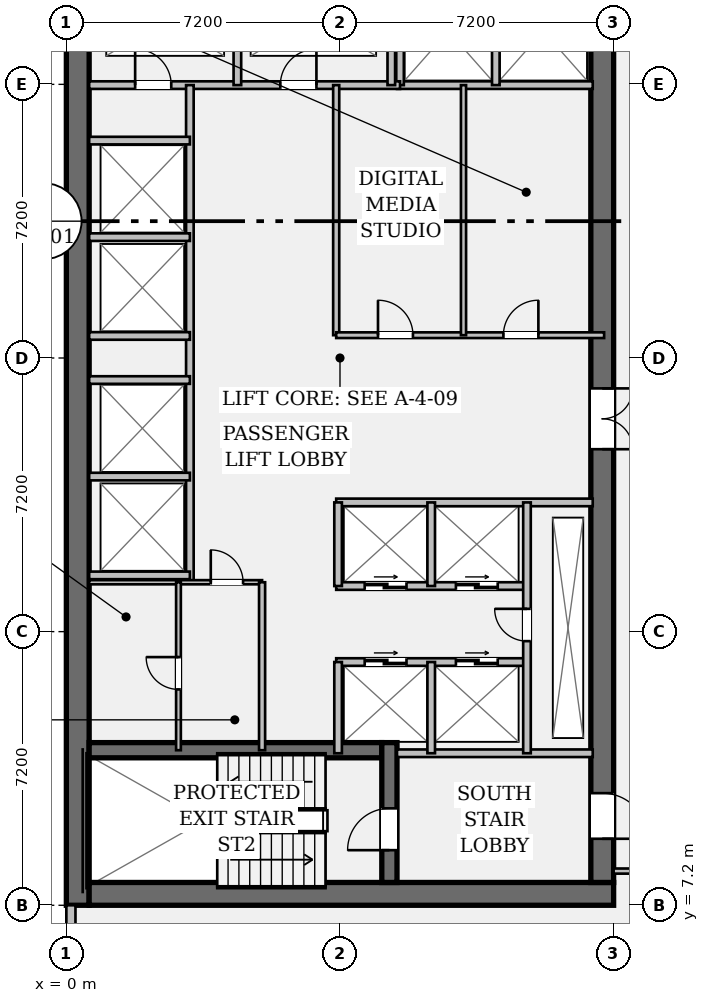
"""IFC4 building model, lengths in metres.
Left out: names, types, materials, properties, quantities, classifications, styles, units other than length and angle.
Written with IfcOpenShell. Run it as: python <this file> out.ifc"""

import sys

from ifc_helpers import new_model, si_unit, direction, frame, frame_2d, origin, place, context, subcontext, project, spatial, rectangle, extrude, element, fill, save


model = new_model("IFC4")
c1 = context("Model", 3, precision=1e-05, world=origin(), true_north=direction((0.0, 1.0)))
c2 = subcontext(c1, "Body", "Model", "MODEL_VIEW")
j1 = project(units=[si_unit("LENGTHUNIT", "METRE"), si_unit("PLANEANGLEUNIT", "RADIAN")], contexts=[c1])
p1 = place(None, origin())
s1 = spatial("IfcSite", under=j1, at=p1, CompositionType="ELEMENT")
p2 = place(p1, origin())
s2 = spatial("IfcBuilding", under=s1, at=p2, CompositionType="ELEMENT")
p3 = place(p2, frame((0.0, 0.0, 156.1)))
s3 = spatial("IfcBuildingStorey", under=s2, at=p3, CompositionType="ELEMENT", Elevation=156.1)
p4 = place(p3, frame((0.3, 7.2, 0.0), z_axis=(0.0, 0.0, 1.0), x_axis=(0.0, 1.0, 0.0)))
e1 = element("IfcWall", 1, at=p4, inside=s3, PredefinedType="SHEAR", context=c2, shape_type="SweptSolid", body=[
    extrude(rectangle(XDim=28.8, YDim=0.6, at=frame_2d((14.4, 0.0))), origin(), (0.0, 0.0, 1.0), 3.58),
])
p5 = place(p3, frame((0.6, 7.5, 0.0), z_axis=(0.0, 0.0, 1.0), x_axis=(1.0, 0.0, 0.0)))
e2 = element("IfcWall", 2, at=p5, inside=s3, PredefinedType="SHEAR", context=c2, shape_type="SweptSolid", body=[
    extrude(rectangle(XDim=13.8, YDim=0.6, at=frame_2d((6.9, 0.0))), origin(), (0.0, 0.0, 1.0), 3.58),
])
p6 = place(p3, frame((14.1, 35.4, 0.0), z_axis=(0.0, 0.0, 1.0), x_axis=(0.0, -1.0, 0.0)))
e3 = element("IfcWall", 3, at=p6, inside=s3, PredefinedType="SHEAR", context=c2, shape_type="SweptSolid", body=[
    extrude(rectangle(XDim=27.6, YDim=0.6, at=frame_2d((13.8, 0.0))), origin(), (0.0, 0.0, 1.0), 3.58),
])
p7 = place(p6, frame((1.3, 0.0, 0.0)))
e4 = element("IfcOpeningElement", 4, at=p7, cuts=e3, PredefinedType="OPENING", context=c2, shape_type="SweptSolid", body=[
    extrude(rectangle(XDim=1.2, YDim=2.15, at=frame_2d((0.6, 1.075))), frame((0.0, 0.312, 0.0), z_axis=(0.0, -1.0, 0.0), x_axis=(1.0, 0.0, 0.0)), (0.0, 0.0, 1.0), 0.624),
])
p8 = place(p6, frame((25.25, 0.0, 0.0)))
e5 = element("IfcOpeningElement", 5, at=p8, cuts=e3, PredefinedType="OPENING", context=c2, shape_type="SweptSolid", body=[
    extrude(rectangle(XDim=1.2, YDim=2.15, at=frame_2d((0.6, 1.075))), frame((0.0, 0.312, 0.0), z_axis=(0.0, -1.0, 0.0), x_axis=(1.0, 0.0, 0.0)), (0.0, 0.0, 1.0), 0.624),
])
p9 = place(p6, frame((14.6, 0.0, 0.0)))
e6 = element("IfcOpeningElement", 6, at=p9, cuts=e3, PredefinedType="OPENING", context=c2, shape_type="SweptSolid", body=[
    extrude(rectangle(XDim=1.6, YDim=2.2, at=frame_2d((0.8, 1.1))), frame((0.0, 0.312, 0.0), z_axis=(0.0, -1.0, 0.0), x_axis=(1.0, 0.0, 0.0)), (0.0, 0.0, 1.0), 0.624),
])
p10 = place(p3, frame((0.6, 11.28, 0.0), z_axis=(0.0, 0.0, 1.0), x_axis=(1.0, 0.0, 0.0)))
e7 = element("IfcWall", 7, at=p10, inside=s3, PredefinedType="SHEAR", context=c2, shape_type="SweptSolid", body=[
    extrude(rectangle(XDim=7.7, YDim=0.4, at=frame_2d((3.85, 0.0))), origin(), (0.0, 0.0, 1.0), 3.58),
])
p11 = place(p3, frame((8.5, 7.8, 0.0), z_axis=(0.0, 0.0, 1.0), x_axis=(0.0, 1.0, 0.0)))
e8 = element("IfcWall", 8, at=p11, inside=s3, PredefinedType="SHEAR", context=c2, shape_type="SweptSolid", body=[
    extrude(rectangle(XDim=3.68, YDim=0.4, at=frame_2d((1.84, 0.0))), origin(), (0.0, 0.0, 1.0), 3.58),
])
p12 = place(p11, frame((0.85, 0.0, 0.0)))
e9 = element("IfcOpeningElement", 9, at=p12, cuts=e8, PredefinedType="OPENING", context=c2, shape_type="SweptSolid", body=[
    extrude(rectangle(XDim=1.1, YDim=2.15, at=frame_2d((0.55, 1.075))), frame((0.0, 0.212, 0.0), z_axis=(0.0, -1.0, 0.0), x_axis=(1.0, 0.0, 0.0)), (0.0, 0.0, 1.0), 0.424),
])
p13 = place(p3, frame((0.12, 5.95, 0.0), z_axis=(0.0, 0.0, 1.0), x_axis=(0.0, 1.0, 0.0)))
e10 = element("IfcWall", 10, at=p13, inside=s3, PredefinedType="STANDARD", context=c2, shape_type="SweptSolid", body=[
    extrude(rectangle(XDim=1.25, YDim=0.24, at=frame_2d((0.625, 0.0))), origin(), (0.0, 0.0, 1.0), 3.58),
])
for number, where, z_axis, x_axis in (
    (11, (8.7, 11.2, 0.0), (0.0, 0.0, 1.0), (1.0, 0.0, 0.0)),
    (12, (8.7, 28.78, 0.0), (0.0, 0.0, 1.0), (1.0, 0.0, 0.0)),
):
    element("IfcWall", number, at=place(p3, frame(where, z_axis=z_axis, x_axis=x_axis)), inside=s3, PredefinedType="PARTITIONING", context=c2, shape_type="SweptSolid", body=[
        extrude(rectangle(XDim=5.15, YDim=0.2, at=frame_2d((2.575, 0.0))), origin(), (0.0, 0.0, 1.0), 3.58),
    ])
for number, where, z_axis, x_axis in (
    (13, (8.78, 28.78, 0.0), (0.0, 0.0, 1.0), (0.0, 1.0, 0.0)),
    (14, (11.3, 28.78, 0.0), (0.0, 0.0, 1.0), (0.0, 1.0, 0.0)),
):
    element("IfcWall", number, at=place(p3, frame(where, z_axis=z_axis, x_axis=x_axis)), inside=s3, PredefinedType="PARTITIONING", context=c2, shape_type="SweptSolid", body=[
        extrude(rectangle(XDim=3.1, YDim=0.2, at=frame_2d((1.55, 0.0))), origin(), (0.0, 0.0, 1.0), 3.58),
    ])
p14 = place(p3, frame((0.6, 28.78, 0.0), z_axis=(0.0, 0.0, 1.0), x_axis=(1.0, 0.0, 0.0)))
e15 = element("IfcWall", 15, at=p14, inside=s3, PredefinedType="PARTITIONING", context=c2, shape_type="SweptSolid", body=[
    extrude(rectangle(XDim=8.18, YDim=0.2, at=frame_2d((4.09, 0.0))), origin(), (0.0, 0.0, 1.0), 3.58),
])
p15 = place(p14, frame((1.21, 0.0, 0.0)))
e16 = element("IfcOpeningElement", 16, at=p15, cuts=e15, PredefinedType="OPENING", context=c2, shape_type="SweptSolid", body=[
    extrude(rectangle(XDim=0.95, YDim=2.15, at=frame_2d((0.475, 1.075))), frame((0.0, 0.112, 0.0), z_axis=(0.0, -1.0, 0.0), x_axis=(1.0, 0.0, 0.0)), (0.0, 0.0, 1.0), 0.224),
])
p16 = place(p14, frame((5.03, 0.0, 0.0)))
e17 = element("IfcOpeningElement", 17, at=p16, cuts=e15, PredefinedType="OPENING", context=c2, shape_type="SweptSolid", body=[
    extrude(rectangle(XDim=0.95, YDim=2.15, at=frame_2d((0.475, 1.075))), frame((0.0, 0.112, 0.0), z_axis=(0.0, -1.0, 0.0), x_axis=(1.0, 0.0, 0.0)), (0.0, 0.0, 1.0), 0.224),
])
for number, where, z_axis, x_axis in (
    (18, (4.5, 28.78, 0.0), (0.0, 0.0, 1.0), (0.0, 1.0, 0.0)),
    (19, (8.55, 28.78, 0.0), (0.0, 0.0, 1.0), (0.0, 1.0, 0.0)),
):
    element("IfcWall", number, at=place(p3, frame(where, z_axis=z_axis, x_axis=x_axis)), inside=s3, PredefinedType="PARTITIONING", context=c2, shape_type="SweptSolid", body=[
        extrude(rectangle(XDim=2.94, YDim=0.2, at=frame_2d((1.47, 0.0))), origin(), (0.0, 0.0, 1.0), 3.58),
    ])
p17 = place(p3, frame((3.25, 15.7, 0.0), z_axis=(0.0, 0.0, 1.0), x_axis=(0.0, 1.0, 0.0)))
e20 = element("IfcWall", 20, at=p17, inside=s3, PredefinedType="PARTITIONING", context=c2, shape_type="SweptSolid", body=[
    extrude(rectangle(XDim=13.08, YDim=0.2, at=frame_2d((6.54, 0.0))), origin(), (0.0, 0.0, 1.0), 3.58),
])
for number, where, z_axis, x_axis in (
    (21, (0.6, 15.88, 0.0), (0.0, 0.0, 1.0), (1.0, 0.0, 0.0)),
    (22, (0.6, 18.48, 0.0), (0.0, 0.0, 1.0), (1.0, 0.0, 0.0)),
    (23, (0.6, 22.18, 0.0), (0.0, 0.0, 1.0), (1.0, 0.0, 0.0)),
    (24, (0.6, 24.78, 0.0), (0.0, 0.0, 1.0), (1.0, 0.0, 0.0)),
    (25, (0.6, 21.02, 0.0), (0.0, 0.0, 1.0), (1.0, 0.0, 0.0)),
    (26, (0.6, 27.32, 0.0), (0.0, 0.0, 1.0), (1.0, 0.0, 0.0)),
):
    element("IfcWall", number, at=place(p3, frame(where, z_axis=z_axis, x_axis=x_axis)), inside=s3, PredefinedType="PARTITIONING", context=c2, shape_type="SweptSolid", body=[
        extrude(rectangle(XDim=2.65, YDim=0.2, at=frame_2d((1.325, 0.0))), origin(), (0.0, 0.0, 1.0), 3.58),
    ])
p18 = place(p3, frame((7.1, 22.2, 0.0), z_axis=(0.0, 0.0, 1.0), x_axis=(0.0, 1.0, 0.0)))
e27 = element("IfcWall", 27, at=p18, inside=s3, PredefinedType="PARTITIONING", context=c2, shape_type="SweptSolid", body=[
    extrude(rectangle(XDim=6.58, YDim=0.16, at=frame_2d((3.29, 0.0))), origin(), (0.0, 0.0, 1.0), 3.58),
])
p19 = place(p3, frame((7.1, 22.2, 0.0), z_axis=(0.0, 0.0, 1.0), x_axis=(1.0, 0.0, 0.0)))
e28 = element("IfcWall", 28, at=p19, inside=s3, PredefinedType="PARTITIONING", context=c2, shape_type="SweptSolid", body=[
    extrude(rectangle(XDim=7.05, YDim=0.15, at=frame_2d((3.525, 0.0))), origin(), (0.0, 0.0, 1.0), 3.58),
])
p20 = place(p19, frame((1.1, 0.0, 0.0)))
e29 = element("IfcOpeningElement", 29, at=p20, cuts=e28, PredefinedType="OPENING", context=c2, shape_type="SweptSolid", body=[
    extrude(rectangle(XDim=0.92, YDim=2.15, at=frame_2d((0.46, 1.075))), frame((0.0, 0.087, 0.0), z_axis=(0.0, -1.0, 0.0), x_axis=(1.0, 0.0, 0.0)), (0.0, 0.0, 1.0), 0.174),
])
p21 = place(p19, frame((4.4, 0.0, 0.0)))
e30 = element("IfcOpeningElement", 30, at=p21, cuts=e28, PredefinedType="OPENING", context=c2, shape_type="SweptSolid", body=[
    extrude(rectangle(XDim=0.92, YDim=2.15, at=frame_2d((0.46, 1.075))), frame((0.0, 0.087, 0.0), z_axis=(0.0, -1.0, 0.0), x_axis=(1.0, 0.0, 0.0)), (0.0, 0.0, 1.0), 0.174),
])
p22 = place(p3, frame((10.45, 22.2, 0.0), z_axis=(0.0, 0.0, 1.0), x_axis=(0.0, 1.0, 0.0)))
e31 = element("IfcWall", 31, at=p22, inside=s3, PredefinedType="PARTITIONING", context=c2, shape_type="SweptSolid", body=[
    extrude(rectangle(XDim=6.58, YDim=0.135, at=frame_2d((3.29, 0.0))), origin(), (0.0, 0.0, 1.0), 3.58),
])
p23 = place(p3, frame((7.1, 17.8, 0.0), z_axis=(0.0, 0.0, 1.0), x_axis=(1.0, 0.0, 0.0)))
e32 = element("IfcWall", 32, at=p23, inside=s3, PredefinedType="PARTITIONING", context=c2, shape_type="SweptSolid", body=[
    extrude(rectangle(XDim=6.75, YDim=0.2, at=frame_2d((3.375, 0.0))), origin(), (0.0, 0.0, 1.0), 3.58),
])
p24 = place(p3, frame((7.1, 15.6, 0.0), z_axis=(0.0, 0.0, 1.0), x_axis=(1.0, 0.0, 0.0)))
e33 = element("IfcWall", 33, at=p24, inside=s3, PredefinedType="PARTITIONING", context=c2, shape_type="SweptSolid", body=[
    extrude(rectangle(XDim=5.02, YDim=0.2, at=frame_2d((2.51, 0.0))), origin(), (0.0, 0.0, 1.0), 3.58),
])
p25 = place(p24, frame((0.75, 0.0, 0.0)))
e34 = element("IfcOpeningElement", 34, at=p25, cuts=e33, PredefinedType="OPENING", context=c2, shape_type="SweptSolid", body=[
    extrude(rectangle(XDim=1.1, YDim=2.2, at=frame_2d((0.55, 1.1))), frame((0.0, 0.112, 0.0), z_axis=(0.0, -1.0, 0.0), x_axis=(1.0, 0.0, 0.0)), (0.0, 0.0, 1.0), 0.224),
])
p26 = place(p24, frame((3.15, 0.0, 0.0)))
e35 = element("IfcOpeningElement", 35, at=p26, cuts=e33, PredefinedType="OPENING", context=c2, shape_type="SweptSolid", body=[
    extrude(rectangle(XDim=1.1, YDim=2.2, at=frame_2d((0.55, 1.1))), frame((0.0, 0.112, 0.0), z_axis=(0.0, -1.0, 0.0), x_axis=(1.0, 0.0, 0.0)), (0.0, 0.0, 1.0), 0.224),
])
p27 = place(p3, frame((7.1, 13.6, 0.0), z_axis=(0.0, 0.0, 1.0), x_axis=(1.0, 0.0, 0.0)))
e36 = element("IfcWall", 36, at=p27, inside=s3, PredefinedType="PARTITIONING", context=c2, shape_type="SweptSolid", body=[
    extrude(rectangle(XDim=5.02, YDim=0.2, at=frame_2d((2.51, 0.0))), origin(), (0.0, 0.0, 1.0), 3.58),
])
p28 = place(p27, frame((0.75, 0.0, 0.0)))
e37 = element("IfcOpeningElement", 37, at=p28, cuts=e36, PredefinedType="OPENING", context=c2, shape_type="SweptSolid", body=[
    extrude(rectangle(XDim=1.1, YDim=2.2, at=frame_2d((0.55, 1.1))), frame((0.0, 0.112, 0.0), z_axis=(0.0, -1.0, 0.0), x_axis=(1.0, 0.0, 0.0)), (0.0, 0.0, 1.0), 0.224),
])
p29 = place(p27, frame((3.15, 0.0, 0.0)))
e38 = element("IfcOpeningElement", 38, at=p29, cuts=e36, PredefinedType="OPENING", context=c2, shape_type="SweptSolid", body=[
    extrude(rectangle(XDim=1.1, YDim=2.2, at=frame_2d((0.55, 1.1))), frame((0.0, 0.112, 0.0), z_axis=(0.0, -1.0, 0.0), x_axis=(1.0, 0.0, 0.0)), (0.0, 0.0, 1.0), 0.224),
])
p30 = place(p3, frame((7.15, 15.6, 0.0), z_axis=(0.0, 0.0, 1.0), x_axis=(0.0, 1.0, 0.0)))
e39 = element("IfcWall", 39, at=p30, inside=s3, PredefinedType="PARTITIONING", context=c2, shape_type="SweptSolid", body=[
    extrude(rectangle(XDim=2.2, YDim=0.2, at=frame_2d((1.1, 0.0))), origin(), (0.0, 0.0, 1.0), 3.58),
])
p31 = place(p3, frame((7.15, 11.2, 0.0), z_axis=(0.0, 0.0, 1.0), x_axis=(0.0, 1.0, 0.0)))
e40 = element("IfcWall", 40, at=p31, inside=s3, PredefinedType="PARTITIONING", context=c2, shape_type="SweptSolid", body=[
    extrude(rectangle(XDim=2.4, YDim=0.2, at=frame_2d((1.2, 0.0))), origin(), (0.0, 0.0, 1.0), 3.58),
])
p32 = place(p3, frame((9.6, 15.6, 0.0), z_axis=(0.0, 0.0, 1.0), x_axis=(0.0, 1.0, 0.0)))
e41 = element("IfcWall", 41, at=p32, inside=s3, PredefinedType="PARTITIONING", context=c2, shape_type="SweptSolid", body=[
    extrude(rectangle(XDim=2.2, YDim=0.2, at=frame_2d((1.1, 0.0))), origin(), (0.0, 0.0, 1.0), 3.58),
])
p33 = place(p3, frame((9.6, 11.2, 0.0), z_axis=(0.0, 0.0, 1.0), x_axis=(0.0, 1.0, 0.0)))
e42 = element("IfcWall", 42, at=p33, inside=s3, PredefinedType="PARTITIONING", context=c2, shape_type="SweptSolid", body=[
    extrude(rectangle(XDim=2.4, YDim=0.2, at=frame_2d((1.2, 0.0))), origin(), (0.0, 0.0, 1.0), 3.58),
])
p34 = place(p3, frame((12.12, 11.2, 0.0), z_axis=(0.0, 0.0, 1.0), x_axis=(0.0, 1.0, 0.0)))
e43 = element("IfcWall", 43, at=p34, inside=s3, PredefinedType="PARTITIONING", context=c2, shape_type="SweptSolid", body=[
    extrude(rectangle(XDim=6.6, YDim=0.2, at=frame_2d((3.3, 0.0))), origin(), (0.0, 0.0, 1.0), 3.58),
])
p35 = place(p34, frame((2.95, 0.0, 0.0)))
e44 = element("IfcOpeningElement", 44, at=p35, cuts=e43, PredefinedType="OPENING", context=c2, shape_type="SweptSolid", body=[
    extrude(rectangle(XDim=0.85, YDim=2.15, at=frame_2d((0.425, 1.075))), frame((0.0, 0.112, 0.0), z_axis=(0.0, -1.0, 0.0), x_axis=(1.0, 0.0, 0.0)), (0.0, 0.0, 1.0), 0.224),
])
p36 = place(p3, frame((0.6, 15.7, 0.0), z_axis=(0.0, 0.0, 1.0), x_axis=(1.0, 0.0, 0.0)))
e45 = element("IfcWall", 45, at=p36, inside=s3, PredefinedType="PARTITIONING", context=c2, shape_type="SweptSolid", body=[
    extrude(rectangle(XDim=4.55, YDim=0.11, at=frame_2d((2.275, 0.0))), origin(), (0.0, 0.0, 1.0), 3.58),
])
p37 = place(p36, frame((3.2, 0.0, 0.0)))
e46 = element("IfcOpeningElement", 46, at=p37, cuts=e45, PredefinedType="OPENING", context=c2, shape_type="SweptSolid", body=[
    extrude(rectangle(XDim=0.85, YDim=2.15, at=frame_2d((0.425, 1.075))), frame((0.0, 0.067, 0.0), z_axis=(0.0, -1.0, 0.0), x_axis=(1.0, 0.0, 0.0)), (0.0, 0.0, 1.0), 0.134),
])
p38 = place(p3, frame((5.15, 11.28, 0.0), z_axis=(0.0, 0.0, 1.0), x_axis=(0.0, 1.0, 0.0)))
e47 = element("IfcWall", 47, at=p38, inside=s3, PredefinedType="PARTITIONING", context=c2, shape_type="SweptSolid", body=[
    extrude(rectangle(XDim=4.42, YDim=0.16, at=frame_2d((2.21, 0.0))), origin(), (0.0, 0.0, 1.0), 3.58),
])
p39 = place(p3, frame((2.95, 11.28, 0.0), z_axis=(0.0, 0.0, 1.0), x_axis=(0.0, 1.0, 0.0)))
e48 = element("IfcWall", 48, at=p39, inside=s3, PredefinedType="PARTITIONING", context=c2, shape_type="SweptSolid", body=[
    extrude(rectangle(XDim=4.42, YDim=0.125, at=frame_2d((2.21, 0.0))), origin(), (0.0, 0.0, 1.0), 3.58),
])
p40 = place(p39, frame((1.6, 0.0, 0.0)))
e49 = element("IfcOpeningElement", 49, at=p40, cuts=e48, PredefinedType="OPENING", context=c2, shape_type="SweptSolid", body=[
    extrude(rectangle(XDim=0.85, YDim=2.15, at=frame_2d((0.425, 1.075))), frame((0.0, 0.074, 0.0), z_axis=(0.0, -1.0, 0.0), x_axis=(1.0, 0.0, 0.0)), (0.0, 0.0, 1.0), 0.149),
])
p41 = place(p3, frame((14.4, 8.1, 0.0), z_axis=(0.0, 0.0, 1.0), x_axis=(1.0, 0.0, 0.0)))
e50 = element("IfcWall", 50, at=p41, inside=s3, PredefinedType="PARTITIONING", context=c2, shape_type="SweptSolid", body=[
    extrude(rectangle(XDim=2.95, YDim=0.135, at=frame_2d((1.475, 0.0))), origin(), (0.0, 0.0, 1.0), 3.148),
])
p42 = place(p41, frame((0.95, 0.0, 0.0)))
e51 = element("IfcOpeningElement", 51, at=p42, cuts=e50, PredefinedType="OPENING", context=c2, shape_type="SweptSolid", body=[
    extrude(rectangle(XDim=0.92, YDim=2.15, at=frame_2d((0.46, 1.075))), frame((0.0, 0.08, 0.0), z_axis=(0.0, -1.0, 0.0), x_axis=(1.0, 0.0, 0.0)), (0.0, 0.0, 1.0), 0.159),
])
p43 = place(p12, origin())
e52 = element("IfcDoor", 52, at=p43, inside=s3, OperationType="SINGLE_SWING_LEFT", PredefinedType="DOOR", context=c2, shape_type="SweptSolid", body=[
    extrude(rectangle(XDim=1.1, YDim=2.15, at=frame_2d((0.55, 1.075))), frame((0.0, 0.025, 0.0), z_axis=(0.0, -1.0, 0.0), x_axis=(1.0, 0.0, 0.0)), (0.0, 0.0, 1.0), 0.05),
])
fill(e9, e52)
p44 = place(p8, origin())
e53 = element("IfcDoor", 53, at=p44, inside=s3, OperationType="SINGLE_SWING_RIGHT", PredefinedType="DOOR", context=c2, shape_type="SweptSolid", body=[
    extrude(rectangle(XDim=1.2, YDim=2.15, at=frame_2d((0.6, 1.075))), frame((0.0, 0.025, 0.0), z_axis=(0.0, -1.0, 0.0), x_axis=(1.0, 0.0, 0.0)), (0.0, 0.0, 1.0), 0.05),
])
fill(e5, e53)
p45 = place(p15, origin())
e54 = element("IfcDoor", 54, at=p45, inside=s3, OperationType="SINGLE_SWING_LEFT", PredefinedType="DOOR", context=c2, shape_type="SweptSolid", body=[
    extrude(rectangle(XDim=0.95, YDim=2.15, at=frame_2d((0.475, 1.075))), frame((0.0, 0.025, 0.0), z_axis=(0.0, -1.0, 0.0), x_axis=(1.0, 0.0, 0.0)), (0.0, 0.0, 1.0), 0.05),
])
fill(e16, e54)
p46 = place(p16, origin())
e55 = element("IfcDoor", 55, at=p46, inside=s3, OperationType="SINGLE_SWING_RIGHT", PredefinedType="DOOR", context=c2, shape_type="SweptSolid", body=[
    extrude(rectangle(XDim=0.95, YDim=2.15, at=frame_2d((0.475, 1.075))), frame((0.0, 0.025, 0.0), z_axis=(0.0, -1.0, 0.0), x_axis=(1.0, 0.0, 0.0)), (0.0, 0.0, 1.0), 0.05),
])
fill(e17, e55)
p47 = place(p9, origin())
e56 = element("IfcDoor", 56, at=p47, inside=s3, OperationType="DOUBLE_DOOR_SINGLE_SWING", PredefinedType="DOOR", context=c2, shape_type="SweptSolid", body=[
    extrude(rectangle(XDim=1.6, YDim=2.2, at=frame_2d((0.8, 1.1))), frame((0.0, 0.025, 0.0), z_axis=(0.0, -1.0, 0.0), x_axis=(1.0, 0.0, 0.0)), (0.0, 0.0, 1.0), 0.05),
])
fill(e6, e56)
p48 = place(p20, origin())
e57 = element("IfcDoor", 57, at=p48, inside=s3, OperationType="SINGLE_SWING_LEFT", PredefinedType="DOOR", context=c2, shape_type="SweptSolid", body=[
    extrude(rectangle(XDim=0.92, YDim=2.15, at=frame_2d((0.46, 1.075))), frame((0.0, 0.025, 0.0), z_axis=(0.0, -1.0, 0.0), x_axis=(1.0, 0.0, 0.0)), (0.0, 0.0, 1.0), 0.05),
])
fill(e29, e57)
p49 = place(p21, origin())
e58 = element("IfcDoor", 58, at=p49, inside=s3, OperationType="SINGLE_SWING_RIGHT", PredefinedType="DOOR", context=c2, shape_type="SweptSolid", body=[
    extrude(rectangle(XDim=0.92, YDim=2.15, at=frame_2d((0.46, 1.075))), frame((0.0, 0.025, 0.0), z_axis=(0.0, -1.0, 0.0), x_axis=(1.0, 0.0, 0.0)), (0.0, 0.0, 1.0), 0.05),
])
fill(e30, e58)
p50 = place(p35, origin())
e59 = element("IfcDoor", 59, at=p50, inside=s3, OperationType="SINGLE_SWING_RIGHT", PredefinedType="DOOR", context=c2, shape_type="SweptSolid", body=[
    extrude(rectangle(XDim=0.85, YDim=2.15, at=frame_2d((0.425, 1.075))), frame((0.0, 0.025, 0.0), z_axis=(0.0, -1.0, 0.0), x_axis=(1.0, 0.0, 0.0)), (0.0, 0.0, 1.0), 0.05),
])
fill(e44, e59)
p51 = place(p25, origin())
e60 = element("IfcDoor", 60, at=p51, inside=s3, OperationType="DOUBLE_DOOR_SLIDING", PredefinedType="DOOR", context=c2, shape_type="SweptSolid", body=[
    extrude(rectangle(XDim=1.1, YDim=2.2, at=frame_2d((0.55, 1.1))), frame((0.0, 0.025, 0.0), z_axis=(0.0, -1.0, 0.0), x_axis=(1.0, 0.0, 0.0)), (0.0, 0.0, 1.0), 0.05),
])
fill(e34, e60)
p52 = place(p26, origin())
e61 = element("IfcDoor", 61, at=p52, inside=s3, OperationType="DOUBLE_DOOR_SLIDING", PredefinedType="DOOR", context=c2, shape_type="SweptSolid", body=[
    extrude(rectangle(XDim=1.1, YDim=2.2, at=frame_2d((0.55, 1.1))), frame((0.0, 0.025, 0.0), z_axis=(0.0, -1.0, 0.0), x_axis=(1.0, 0.0, 0.0)), (0.0, 0.0, 1.0), 0.05),
])
fill(e35, e61)
p53 = place(p28, origin())
e62 = element("IfcDoor", 62, at=p53, inside=s3, OperationType="DOUBLE_DOOR_SLIDING", PredefinedType="DOOR", context=c2, shape_type="SweptSolid", body=[
    extrude(rectangle(XDim=1.1, YDim=2.2, at=frame_2d((0.55, 1.1))), frame((0.0, 0.025, 0.0), z_axis=(0.0, -1.0, 0.0), x_axis=(1.0, 0.0, 0.0)), (0.0, 0.0, 1.0), 0.05),
])
fill(e37, e62)
p54 = place(p29, origin())
e63 = element("IfcDoor", 63, at=p54, inside=s3, OperationType="DOUBLE_DOOR_SLIDING", PredefinedType="DOOR", context=c2, shape_type="SweptSolid", body=[
    extrude(rectangle(XDim=1.1, YDim=2.2, at=frame_2d((0.55, 1.1))), frame((0.0, 0.025, 0.0), z_axis=(0.0, -1.0, 0.0), x_axis=(1.0, 0.0, 0.0)), (0.0, 0.0, 1.0), 0.05),
])
fill(e38, e63)
p55 = place(p37, origin())
e64 = element("IfcDoor", 64, at=p55, inside=s3, OperationType="SINGLE_SWING_LEFT", PredefinedType="DOOR", context=c2, shape_type="SweptSolid", body=[
    extrude(rectangle(XDim=0.85, YDim=2.15, at=frame_2d((0.425, 1.075))), frame((0.0, 0.025, 0.0), z_axis=(0.0, -1.0, 0.0), x_axis=(1.0, 0.0, 0.0)), (0.0, 0.0, 1.0), 0.05),
])
fill(e46, e64)
p56 = place(p40, origin())
e65 = element("IfcDoor", 65, at=p56, inside=s3, OperationType="SINGLE_SWING_RIGHT", PredefinedType="DOOR", context=c2, shape_type="SweptSolid", body=[
    extrude(rectangle(XDim=0.85, YDim=2.15, at=frame_2d((0.425, 1.075))), frame((0.0, 0.025, 0.0), z_axis=(0.0, -1.0, 0.0), x_axis=(1.0, 0.0, 0.0)), (0.0, 0.0, 1.0), 0.05),
])
fill(e49, e65)
save(model, sys.argv[1])
